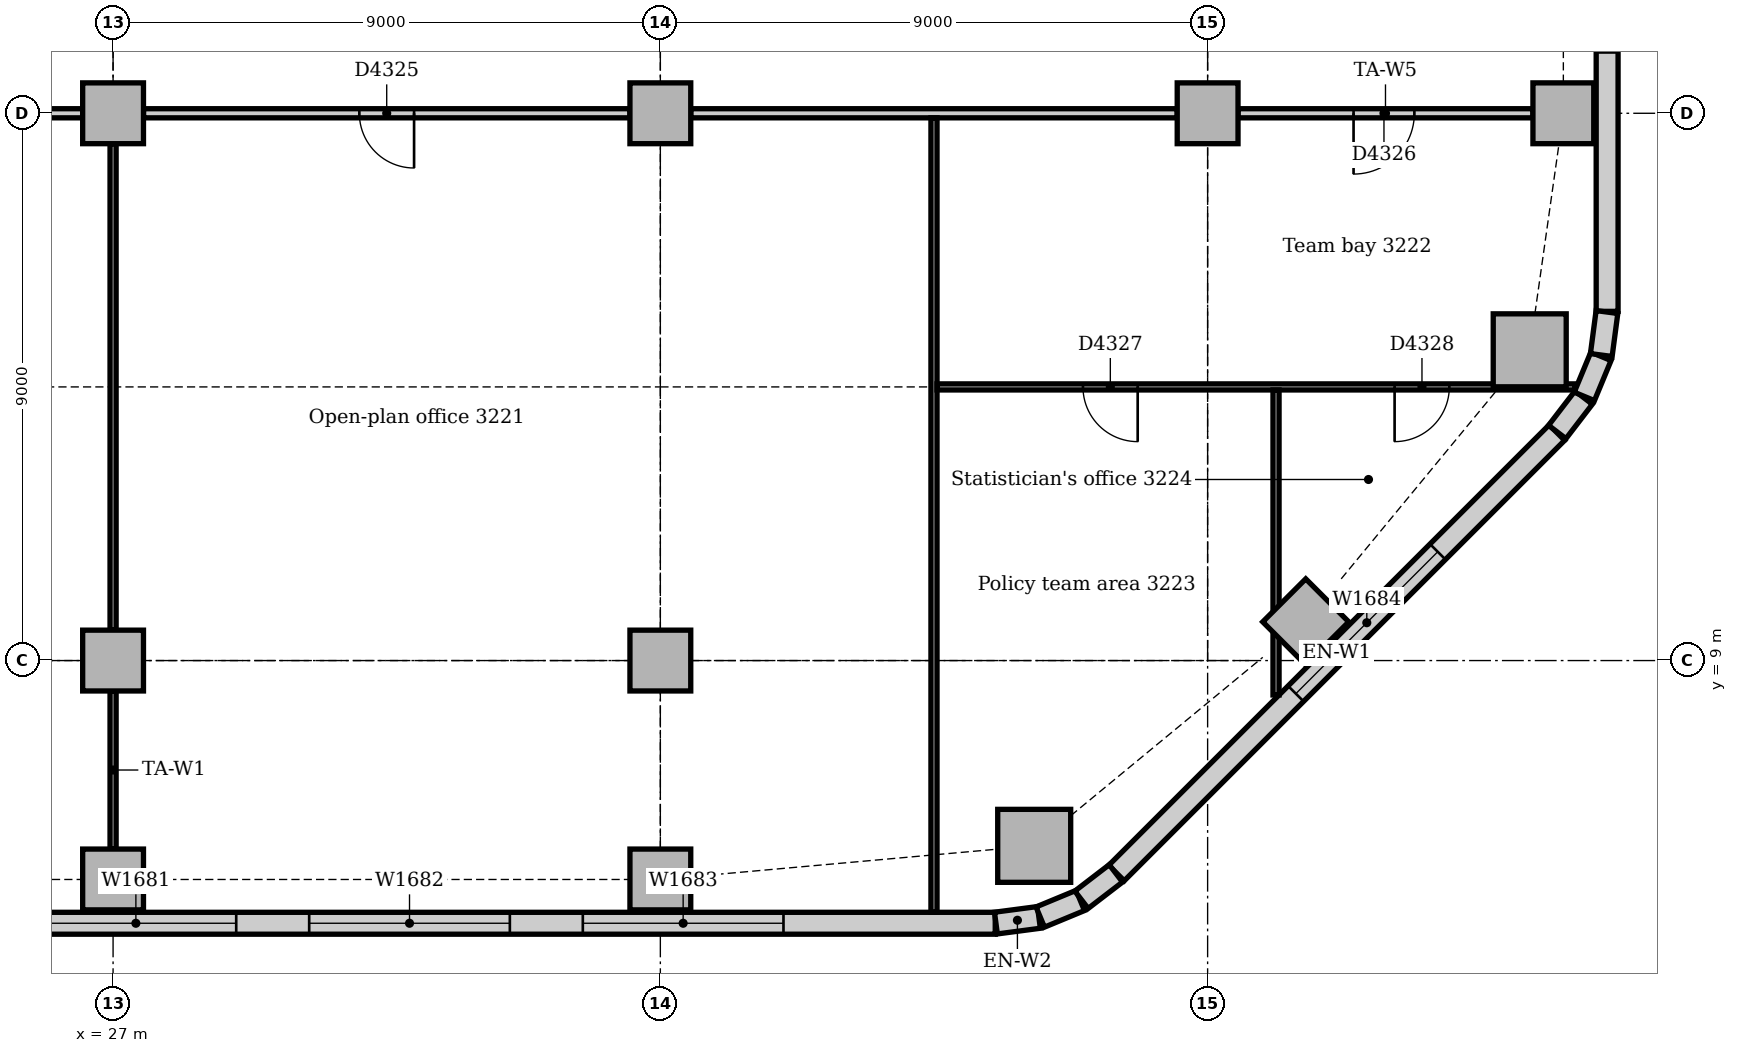
"""IFC4 building model, lengths in metres.
Left out: names, types, materials, properties, quantities, classifications, styles, units other than length and angle.
Written with IfcOpenShell. Run it as: python <this file> out.ifc"""

import sys

from ifc_helpers import new_model, si_unit, direction, frame, frame_2d, origin, origin_2d, place, context, subcontext, project, spatial, rectangle, extrude, element, fill, save


model = new_model("IFC4")
c1 = context("Model", 3, precision=1e-05, world=origin(), true_north=direction((0.0, 1.0)))
c2 = subcontext(c1, "Body", "Model", "MODEL_VIEW")
j1 = project(units=[si_unit("LENGTHUNIT", "METRE"), si_unit("PLANEANGLEUNIT", "RADIAN")], contexts=[c1])
p1 = place(None, origin())
s1 = spatial("IfcSite", under=j1, at=p1, CompositionType="ELEMENT")
p2 = place(p1, origin())
s2 = spatial("IfcBuilding", under=s1, at=p2, CompositionType="ELEMENT")
p3 = place(p2, frame((0.0, 0.0, 136.0)))
s3 = spatial("IfcBuildingStorey", under=s2, at=p3, CompositionType="ELEMENT", Elevation=136.0)
for number, where, z_axis, x_axis in (
    (1, (42.148, 5.953, 0.0), (0.0, 0.0, 1.0), (1.0, 0.0, 0.0)),
    (2, (50.297, 14.102, 0.0), (0.0, 0.0, 1.0), (1.0, 0.0, 0.0)),
):
    element("IfcColumn", number, at=place(p3, frame(where, z_axis=z_axis, x_axis=x_axis)), inside=s3, PredefinedType="COLUMN", context=c2, shape_type="SweptSolid", body=[
        extrude(rectangle(XDim=1.2, YDim=1.2, at=origin_2d()), origin(), (0.0, 0.0, 1.0), 3.85),
    ])
for number, where, z_axis, x_axis in (
    (3, (27.0, 5.4, 0.0), (0.0, 0.0, 1.0), (1.0, 0.0, 0.0)),
    (4, (36.0, 5.4, 0.0), (0.0, 0.0, 1.0), (1.0, 0.0, 0.0)),
    (5, (46.614, 9.636, 0.0), (0.0, 0.0, 1.0), (0.707, 0.707, 0.0)),
    (6, (50.85, 18.0, 0.0), (0.0, 0.0, 1.0), (1.0, 0.0, 0.0)),
    (7, (27.0, 9.0, 0.0), (0.0, 0.0, 1.0), (1.0, 0.0, 0.0)),
    (8, (27.0, 18.0, 0.0), (0.0, 0.0, 1.0), (1.0, 0.0, 0.0)),
    (9, (36.0, 9.0, 0.0), (0.0, 0.0, 1.0), (1.0, 0.0, 0.0)),
    (10, (36.0, 18.0, 0.0), (0.0, 0.0, 1.0), (1.0, 0.0, 0.0)),
    (11, (45.0, 18.0, 0.0), (0.0, 0.0, 1.0), (1.0, 0.0, 0.0)),
):
    element("IfcColumn", number, at=place(p3, frame(where, z_axis=z_axis, x_axis=x_axis)), inside=s3, PredefinedType="COLUMN", context=c2, shape_type="SweptSolid", body=[
        extrude(rectangle(XDim=1.0, YDim=1.0, at=origin_2d()), origin(), (0.0, 0.0, 1.0), 3.85),
    ])
p4 = place(p3, frame((4.243, 4.68, 0.0), z_axis=(0.0, 0.0, 1.0), x_axis=(1.0, 0.0, 0.0)))
e12 = element("IfcWall", 12, at=p4, inside=s3, PredefinedType="STANDARD", context=c2, shape_type="SweptSolid", body=[
    extrude(rectangle(XDim=37.265, YDim=0.36, at=frame_2d((18.632, 0.0))), origin(), (0.0, 0.0, 1.0), 3.85),
])
p5 = place(p4, frame((3.482, 0.0, 0.9)))
e13 = element("IfcOpeningElement", 13, at=p5, cuts=e12, PredefinedType="OPENING", context=c2, shape_type="SweptSolid", body=[
    extrude(rectangle(XDim=3.3, YDim=1.6, at=frame_2d((1.65, 0.8))), frame((0.0, 0.19, 0.0), z_axis=(0.0, -1.0, 0.0), x_axis=(1.0, 0.0, 0.0)), (0.0, 0.0, 1.0), 0.38),
])
p6 = place(p4, frame((9.432, 0.0, 0.9)))
e14 = element("IfcOpeningElement", 14, at=p6, cuts=e12, PredefinedType="OPENING", context=c2, shape_type="SweptSolid", body=[
    extrude(rectangle(XDim=1.8, YDim=1.6, at=frame_2d((0.9, 0.8))), frame((0.0, 0.19, 0.0), z_axis=(0.0, -1.0, 0.0), x_axis=(1.0, 0.0, 0.0)), (0.0, 0.0, 1.0), 0.38),
])
p7 = place(p4, frame((12.482, 0.0, 0.9)))
e15 = element("IfcOpeningElement", 15, at=p7, cuts=e12, PredefinedType="OPENING", context=c2, shape_type="SweptSolid", body=[
    extrude(rectangle(XDim=3.3, YDim=1.6, at=frame_2d((1.65, 0.8))), frame((0.0, 0.19, 0.0), z_axis=(0.0, -1.0, 0.0), x_axis=(1.0, 0.0, 0.0)), (0.0, 0.0, 1.0), 0.38),
])
p8 = place(p4, frame((16.982, 0.0, 0.9)))
e16 = element("IfcOpeningElement", 16, at=p8, cuts=e12, PredefinedType="OPENING", context=c2, shape_type="SweptSolid", body=[
    extrude(rectangle(XDim=3.3, YDim=1.6, at=frame_2d((1.65, 0.8))), frame((0.0, 0.19, 0.0), z_axis=(0.0, -1.0, 0.0), x_axis=(1.0, 0.0, 0.0)), (0.0, 0.0, 1.0), 0.38),
])
p9 = place(p4, frame((21.482, 0.0, 0.9)))
e17 = element("IfcOpeningElement", 17, at=p9, cuts=e12, PredefinedType="OPENING", context=c2, shape_type="SweptSolid", body=[
    extrude(rectangle(XDim=3.3, YDim=1.6, at=frame_2d((1.65, 0.8))), frame((0.0, 0.19, 0.0), z_axis=(0.0, -1.0, 0.0), x_axis=(1.0, 0.0, 0.0)), (0.0, 0.0, 1.0), 0.38),
])
p10 = place(p4, frame((25.982, 0.0, 0.9)))
e18 = element("IfcOpeningElement", 18, at=p10, cuts=e12, PredefinedType="OPENING", context=c2, shape_type="SweptSolid", body=[
    extrude(rectangle(XDim=3.3, YDim=1.6, at=frame_2d((1.65, 0.8))), frame((0.0, 0.19, 0.0), z_axis=(0.0, -1.0, 0.0), x_axis=(1.0, 0.0, 0.0)), (0.0, 0.0, 1.0), 0.38),
])
p11 = place(p4, frame((30.482, 0.0, 0.9)))
e19 = element("IfcOpeningElement", 19, at=p11, cuts=e12, PredefinedType="OPENING", context=c2, shape_type="SweptSolid", body=[
    extrude(rectangle(XDim=3.3, YDim=1.6, at=frame_2d((1.65, 0.8))), frame((0.0, 0.19, 0.0), z_axis=(0.0, -1.0, 0.0), x_axis=(1.0, 0.0, 0.0)), (0.0, 0.0, 1.0), 0.38),
])
p12 = place(p3, frame((43.501, 5.506, 0.0), z_axis=(0.0, 0.0, 1.0), x_axis=(0.707106781187, 0.707106781187, 0.0)))
e20 = element("IfcWall", 20, at=p12, inside=s3, PredefinedType="STANDARD", context=c2, shape_type="SweptSolid", body=[
    extrude(rectangle(XDim=10.243, YDim=0.36, at=frame_2d((5.121, 0.0))), origin(), (0.0, 0.0, 1.0), 3.85),
])
p13 = place(p12, frame((4.171, 0.0, 0.9)))
e21 = element("IfcOpeningElement", 21, at=p13, cuts=e20, PredefinedType="OPENING", context=c2, shape_type="SweptSolid", body=[
    extrude(rectangle(XDim=3.3, YDim=1.6, at=frame_2d((1.65, 0.8))), frame((0.0, 0.19, 0.0), z_axis=(0.0, -1.0, 0.0), x_axis=(1.0, 0.0, 0.0)), (0.0, 0.0, 1.0), 0.38),
])
p14 = place(p3, frame((51.57, 14.743, 0.0), z_axis=(0.0, 0.0, 1.0), x_axis=(0.0, 1.0, 0.0)))
e22 = element("IfcWall", 22, at=p14, inside=s3, PredefinedType="STANDARD", context=c2, shape_type="SweptSolid", body=[
    extrude(rectangle(XDim=24.515, YDim=0.36, at=frame_2d((12.257, 0.0))), origin(), (0.0, 0.0, 1.0), 3.85),
])
p15 = place(p14, frame((4.257, 0.0, 0.9)))
e23 = element("IfcOpeningElement", 23, at=p15, cuts=e22, PredefinedType="OPENING", context=c2, shape_type="SweptSolid", body=[
    extrude(rectangle(XDim=1.8, YDim=1.6, at=frame_2d((0.9, 0.8))), frame((0.0, 0.19, 0.0), z_axis=(0.0, -1.0, 0.0), x_axis=(1.0, 0.0, 0.0)), (0.0, 0.0, 1.0), 0.38),
])
p16 = place(p14, frame((8.357, 0.0, 0.9)))
e24 = element("IfcOpeningElement", 24, at=p16, cuts=e22, PredefinedType="OPENING", context=c2, shape_type="SweptSolid", body=[
    extrude(rectangle(XDim=3.3, YDim=1.6, at=frame_2d((1.65, 0.8))), frame((0.0, 0.19, 0.0), z_axis=(0.0, -1.0, 0.0), x_axis=(1.0, 0.0, 0.0)), (0.0, 0.0, 1.0), 0.38),
])
p17 = place(p14, frame((12.857, 0.0, 0.9)))
e25 = element("IfcOpeningElement", 25, at=p17, cuts=e22, PredefinedType="OPENING", context=c2, shape_type="SweptSolid", body=[
    extrude(rectangle(XDim=3.3, YDim=1.6, at=frame_2d((1.65, 0.8))), frame((0.0, 0.19, 0.0), z_axis=(0.0, -1.0, 0.0), x_axis=(1.0, 0.0, 0.0)), (0.0, 0.0, 1.0), 0.38),
])
p18 = place(p14, frame((17.357, 0.0, 0.9)))
e26 = element("IfcOpeningElement", 26, at=p18, cuts=e22, PredefinedType="OPENING", context=c2, shape_type="SweptSolid", body=[
    extrude(rectangle(XDim=3.3, YDim=1.6, at=frame_2d((1.65, 0.8))), frame((0.0, 0.19, 0.0), z_axis=(0.0, -1.0, 0.0), x_axis=(1.0, 0.0, 0.0)), (0.0, 0.0, 1.0), 0.38),
])
for number, where, z_axis, x_axis in (
    (27, (41.519, 4.683, 0.0), (0.0, 0.0, 1.0), (0.991, 0.131, 0.0)),
    (28, (42.247, 4.782, 0.0), (0.0, 0.0, 1.0), (0.924, 0.383, 0.0)),
):
    element("IfcWall", number, at=place(p3, frame(where, z_axis=z_axis, x_axis=x_axis)), inside=s3, PredefinedType="STANDARD", context=c2, shape_type="SweptSolid", body=[
        extrude(rectangle(XDim=0.713, YDim=0.36, at=frame_2d((0.356, 0.0))), origin(), (0.0, 0.0, 1.0), 3.85),
    ])
for number, where, z_axis, x_axis in (
    (29, (42.925, 5.066, 0.0), (0.0, 0.0, 1.0), (0.793, 0.609, 0.0)),
    (30, (50.75, 12.759, 0.0), (0.0, 0.0, 1.0), (0.609, 0.793, 0.0)),
):
    element("IfcWall", number, at=place(p3, frame(where, z_axis=z_axis, x_axis=x_axis)), inside=s3, PredefinedType="STANDARD", context=c2, shape_type="SweptSolid", body=[
        extrude(rectangle(XDim=0.713, YDim=0.36, at=frame_2d((0.357, 0.0))), origin(), (0.0, 0.0, 1.0), 3.85),
    ])
for number, where, z_axis, x_axis in (
    (31, (51.195, 13.344, 0.0), (0.0, 0.0, 1.0), (0.383, 0.924, 0.0)),
    (32, (51.474, 14.024, 0.0), (0.0, 0.0, 1.0), (0.131, 0.991, 0.0)),
):
    element("IfcWall", number, at=place(p3, frame(where, z_axis=z_axis, x_axis=x_axis)), inside=s3, PredefinedType="STANDARD", context=c2, shape_type="SweptSolid", body=[
        extrude(rectangle(XDim=0.713, YDim=0.36, at=frame_2d((0.356, 0.0))), origin(), (0.0, 0.0, 1.0), 3.85),
    ])
p19 = place(p3, frame((45.5, 18.0, 0.0), z_axis=(0.0, 0.0, 1.0), x_axis=(1.0, 0.0, 0.0)))
e33 = element("IfcWall", 33, at=p19, inside=s3, PredefinedType="PARTITIONING", context=c2, shape_type="SweptSolid", body=[
    extrude(rectangle(XDim=4.85, YDim=0.15, at=frame_2d((2.425, 0.0))), origin(), (0.0, 0.0, 1.0), 3.254),
])
p20 = place(p19, frame((1.9, 0.0, 0.0)))
e34 = element("IfcOpeningElement", 34, at=p20, cuts=e33, PredefinedType="OPENING", context=c2, shape_type="SweptSolid", body=[
    extrude(rectangle(XDim=1.0, YDim=2.1, at=frame_2d((0.5, 1.05))), frame((0.0, 0.085, 0.0), z_axis=(0.0, -1.0, 0.0), x_axis=(1.0, 0.0, 0.0)), (0.0, 0.0, 1.0), 0.17),
])
p21 = place(p3, frame((36.5, 18.0, 0.0), z_axis=(0.0, 0.0, 1.0), x_axis=(1.0, 0.0, 0.0)))
e35 = element("IfcWall", 35, at=p21, inside=s3, PredefinedType="PARTITIONING", context=c2, shape_type="SweptSolid", body=[
    extrude(rectangle(XDim=8.0, YDim=0.15, at=frame_2d((4.0, 0.0))), origin(), (0.0, 0.0, 1.0), 3.158),
])
p22 = place(p3, frame((27.5, 18.0, 0.0), z_axis=(0.0, 0.0, 1.0), x_axis=(1.0, 0.0, 0.0)))
e36 = element("IfcWall", 36, at=p22, inside=s3, PredefinedType="PARTITIONING", context=c2, shape_type="SweptSolid", body=[
    extrude(rectangle(XDim=8.0, YDim=0.15, at=frame_2d((4.0, 0.0))), origin(), (0.0, 0.0, 1.0), 3.158),
])
p23 = place(p22, frame((3.55, 0.0, 0.0)))
e37 = element("IfcOpeningElement", 37, at=p23, cuts=e36, PredefinedType="OPENING", context=c2, shape_type="SweptSolid", body=[
    extrude(rectangle(XDim=0.9, YDim=2.1, at=frame_2d((0.45, 1.05))), frame((0.0, 0.085, 0.0), z_axis=(0.0, -1.0, 0.0), x_axis=(1.0, 0.0, 0.0)), (0.0, 0.0, 1.0), 0.17),
])
p24 = place(p3, frame((18.5, 18.0, 0.0), z_axis=(0.0, 0.0, 1.0), x_axis=(1.0, 0.0, 0.0)))
e38 = element("IfcWall", 38, at=p24, inside=s3, PredefinedType="PARTITIONING", context=c2, shape_type="SweptSolid", body=[
    extrude(rectangle(XDim=8.0, YDim=0.15, at=frame_2d((4.0, 0.0))), origin(), (0.0, 0.0, 1.0), 3.158),
])
p25 = place(p24, frame((3.55, 0.0, 0.0)))
e39 = element("IfcOpeningElement", 39, at=p25, cuts=e38, PredefinedType="OPENING", context=c2, shape_type="SweptSolid", body=[
    extrude(rectangle(XDim=0.9, YDim=2.1, at=frame_2d((0.45, 1.05))), frame((0.0, 0.085, 0.0), z_axis=(0.0, -1.0, 0.0), x_axis=(1.0, 0.0, 0.0)), (0.0, 0.0, 1.0), 0.17),
])
p26 = place(p3, frame((27.0, 5.9, 0.0), z_axis=(0.0, 0.0, 1.0), x_axis=(0.0, 1.0, 0.0)))
e40 = element("IfcWall", 40, at=p26, inside=s3, PredefinedType="PARTITIONING", context=c2, shape_type="SweptSolid", body=[
    extrude(rectangle(XDim=2.6, YDim=0.1, at=frame_2d((1.3, 0.0))), origin(), (0.0, 0.0, 1.0), 3.652),
])
p27 = place(p3, frame((27.0, 9.5, 0.0), z_axis=(0.0, 0.0, 1.0), x_axis=(0.0, 1.0, 0.0)))
e41 = element("IfcWall", 41, at=p27, inside=s3, PredefinedType="PARTITIONING", context=c2, shape_type="SweptSolid", body=[
    extrude(rectangle(XDim=8.0, YDim=0.1, at=frame_2d((4.0, 0.0))), origin(), (0.0, 0.0, 1.0), 3.256),
])
p28 = place(p3, frame((40.5, 4.86, 0.0), z_axis=(0.0, 0.0, 1.0), x_axis=(0.0, 1.0, 0.0)))
e42 = element("IfcWall", 42, at=p28, inside=s3, PredefinedType="PARTITIONING", context=c2, shape_type="SweptSolid", body=[
    extrude(rectangle(XDim=13.065, YDim=0.1, at=frame_2d((6.532, 0.0))), origin(), (0.0, 0.0, 1.0), 3.85),
])
p29 = place(p3, frame((40.55, 13.5, 0.0), z_axis=(0.0, 0.0, 1.0), x_axis=(1.0, 0.0, 0.0)))
e43 = element("IfcWall", 43, at=p29, inside=s3, PredefinedType="PARTITIONING", context=c2, shape_type="SweptSolid", body=[
    extrude(rectangle(XDim=10.494, YDim=0.1, at=frame_2d((5.247, 0.0))), origin(), (0.0, 0.0, 1.0), 3.354),
])
p30 = place(p29, frame((2.4, 0.0, 0.0)))
e44 = element("IfcOpeningElement", 44, at=p30, cuts=e43, PredefinedType="OPENING", context=c2, shape_type="SweptSolid", body=[
    extrude(rectangle(XDim=0.9, YDim=2.1, at=frame_2d((0.45, 1.05))), frame((0.0, 0.06, 0.0), z_axis=(0.0, -1.0, 0.0), x_axis=(1.0, 0.0, 0.0)), (0.0, 0.0, 1.0), 0.12),
])
p31 = place(p29, frame((7.525, 0.0, 0.0)))
e45 = element("IfcOpeningElement", 45, at=p31, cuts=e43, PredefinedType="OPENING", context=c2, shape_type="SweptSolid", body=[
    extrude(rectangle(XDim=0.9, YDim=2.1, at=frame_2d((0.45, 1.05))), frame((0.0, 0.06, 0.0), z_axis=(0.0, -1.0, 0.0), x_axis=(1.0, 0.0, 0.0)), (0.0, 0.0, 1.0), 0.12),
])
p32 = place(p3, frame((46.125, 8.434, 0.0), z_axis=(0.0, 0.0, 1.0), x_axis=(0.0, 1.0, 0.0)))
e46 = element("IfcWall", 46, at=p32, inside=s3, PredefinedType="PARTITIONING", context=c2, shape_type="SweptSolid", body=[
    extrude(rectangle(XDim=5.016, YDim=0.1, at=frame_2d((2.508, 0.0))), origin(), (0.0, 0.0, 1.0), 3.85),
])
p33 = place(p9, origin())
e47 = element("IfcWindow", 47, at=p33, inside=s3, PartitioningType="SINGLE_PANEL", PredefinedType="WINDOW", context=c2, shape_type="SweptSolid", body=[
    extrude(rectangle(XDim=3.3, YDim=1.6, at=frame_2d((1.65, 0.8))), frame((0.0, 0.13, 0.0), z_axis=(0.0, -1.0, 0.0), x_axis=(1.0, 0.0, 0.0)), (0.0, 0.0, 1.0), 0.06),
])
fill(e17, e47)
p34 = place(p10, origin())
e48 = element("IfcWindow", 48, at=p34, inside=s3, PartitioningType="SINGLE_PANEL", PredefinedType="WINDOW", context=c2, shape_type="SweptSolid", body=[
    extrude(rectangle(XDim=3.3, YDim=1.6, at=frame_2d((1.65, 0.8))), frame((0.0, 0.13, 0.0), z_axis=(0.0, -1.0, 0.0), x_axis=(1.0, 0.0, 0.0)), (0.0, 0.0, 1.0), 0.06),
])
fill(e18, e48)
p35 = place(p11, origin())
e49 = element("IfcWindow", 49, at=p35, inside=s3, PartitioningType="SINGLE_PANEL", PredefinedType="WINDOW", context=c2, shape_type="SweptSolid", body=[
    extrude(rectangle(XDim=3.3, YDim=1.6, at=frame_2d((1.65, 0.8))), frame((0.0, 0.13, 0.0), z_axis=(0.0, -1.0, 0.0), x_axis=(1.0, 0.0, 0.0)), (0.0, 0.0, 1.0), 0.06),
])
fill(e19, e49)
p36 = place(p13, origin())
e50 = element("IfcWindow", 50, at=p36, inside=s3, PartitioningType="SINGLE_PANEL", PredefinedType="WINDOW", context=c2, shape_type="SweptSolid", body=[
    extrude(rectangle(XDim=3.3, YDim=1.6, at=frame_2d((1.65, 0.8))), frame((0.0, 0.13, 0.0), z_axis=(0.0, -1.0, 0.0), x_axis=(1.0, 0.0, 0.0)), (0.0, 0.0, 1.0), 0.06),
])
fill(e21, e50)
p37 = place(p23, frame((0.9, 0.0, 0.0), z_axis=(0.0, 0.0, 1.0), x_axis=(-1.0, 0.0, 0.0)))
e51 = element("IfcDoor", 51, at=p37, inside=s3, OperationType="SINGLE_SWING_LEFT", PredefinedType="DOOR", context=c2, shape_type="SweptSolid", body=[
    extrude(rectangle(XDim=0.9, YDim=2.1, at=frame_2d((0.45, 1.05))), frame((0.0, 0.025, 0.0), z_axis=(0.0, -1.0, 0.0), x_axis=(1.0, 0.0, 0.0)), (0.0, 0.0, 1.0), 0.05),
])
fill(e37, e51)
p38 = place(p20, frame((1.0, 0.0, 0.0), z_axis=(0.0, 0.0, 1.0), x_axis=(-1.0, 0.0, 0.0)))
e52 = element("IfcDoor", 52, at=p38, inside=s3, OperationType="SINGLE_SWING_RIGHT", PredefinedType="DOOR", context=c2, shape_type="SweptSolid", body=[
    extrude(rectangle(XDim=1.0, YDim=2.1, at=frame_2d((0.5, 1.05))), frame((0.0, 0.025, 0.0), z_axis=(0.0, -1.0, 0.0), x_axis=(1.0, 0.0, 0.0)), (0.0, 0.0, 1.0), 0.05),
])
fill(e34, e52)
p39 = place(p30, frame((0.9, 0.0, 0.0), z_axis=(0.0, 0.0, 1.0), x_axis=(-1.0, 0.0, 0.0)))
e53 = element("IfcDoor", 53, at=p39, inside=s3, OperationType="SINGLE_SWING_LEFT", PredefinedType="DOOR", context=c2, shape_type="SweptSolid", body=[
    extrude(rectangle(XDim=0.9, YDim=2.1, at=frame_2d((0.45, 1.05))), frame((0.0, 0.025, 0.0), z_axis=(0.0, -1.0, 0.0), x_axis=(1.0, 0.0, 0.0)), (0.0, 0.0, 1.0), 0.05),
])
fill(e44, e53)
p40 = place(p31, frame((0.9, 0.0, 0.0), z_axis=(0.0, 0.0, 1.0), x_axis=(-1.0, 0.0, 0.0)))
e54 = element("IfcDoor", 54, at=p40, inside=s3, OperationType="SINGLE_SWING_RIGHT", PredefinedType="DOOR", context=c2, shape_type="SweptSolid", body=[
    extrude(rectangle(XDim=0.9, YDim=2.1, at=frame_2d((0.45, 1.05))), frame((0.0, 0.025, 0.0), z_axis=(0.0, -1.0, 0.0), x_axis=(1.0, 0.0, 0.0)), (0.0, 0.0, 1.0), 0.05),
])
fill(e45, e54)
save(model, sys.argv[1])
